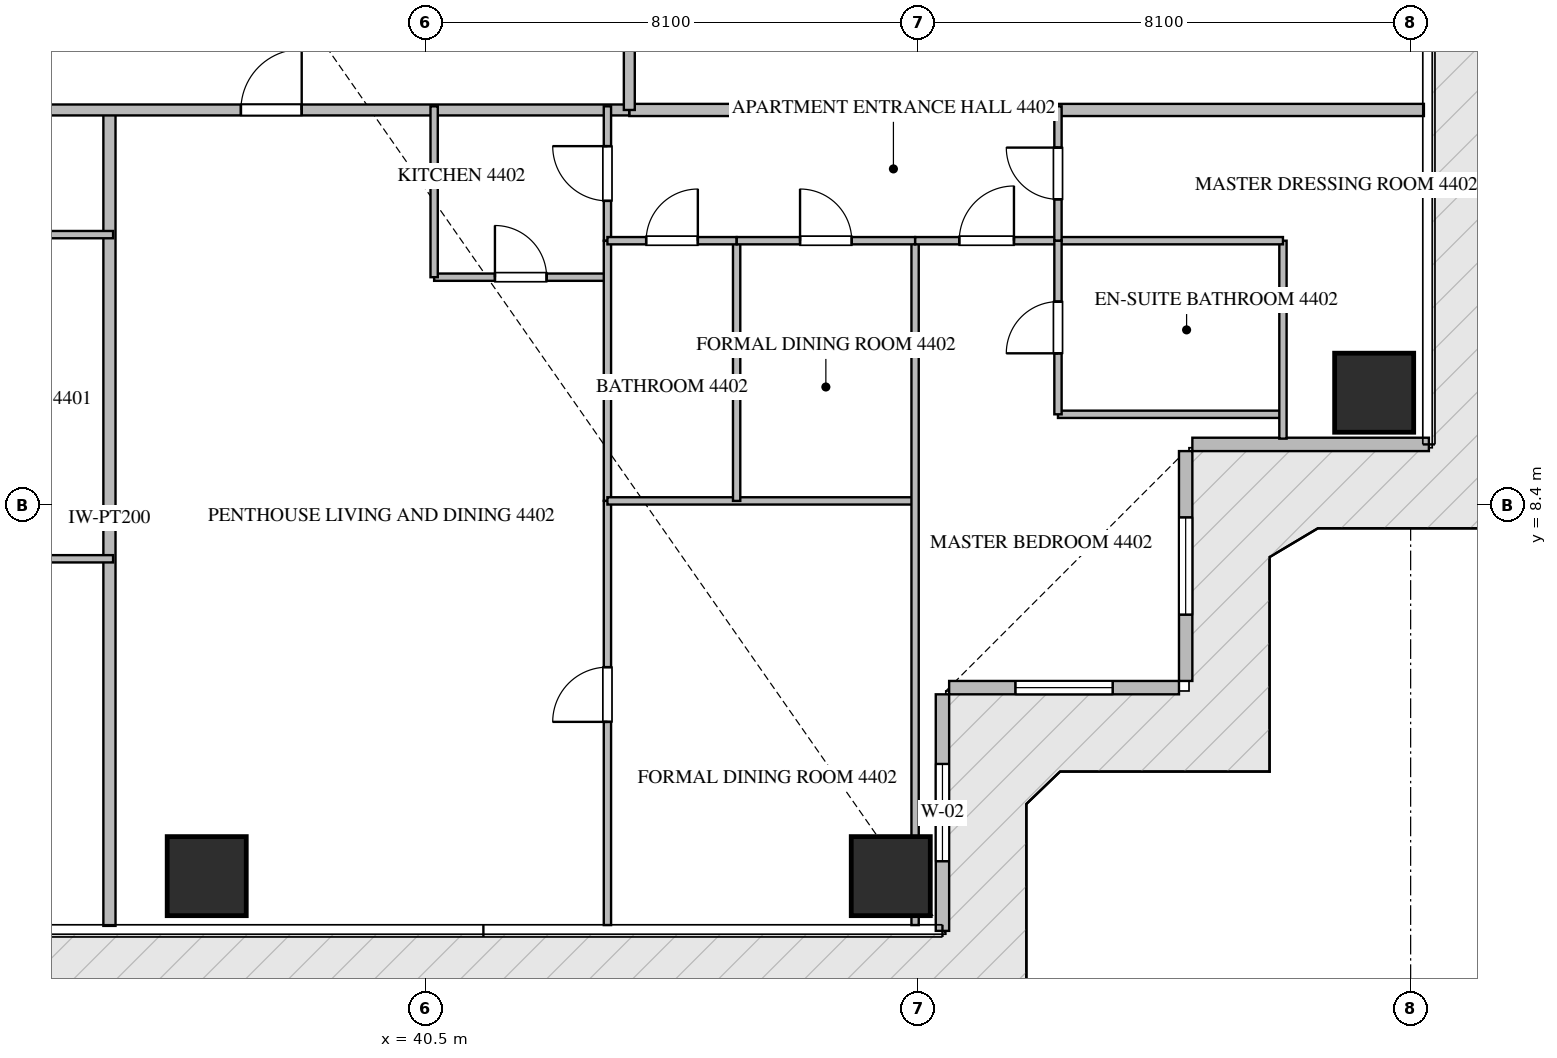
"""IFC4 building model, lengths in metres.
Left out: names, types, materials, properties, quantities, classifications, styles, units other than length and angle.
Written with IfcOpenShell. Run it as: python <this file> out.ifc"""

import sys

from ifc_helpers import new_model, si_unit, direction, frame, frame_2d, origin, origin_2d, place, context, subcontext, project, spatial, rectangle, extrude, source, transform, mapped, element, fill, save


model = new_model("IFC4")
c1 = context("Model", 3, precision=1e-05, world=origin(), true_north=direction((0.0, 1.0)))
c2 = subcontext(c1, "Body", "Model", "MODEL_VIEW")
j1 = project(units=[si_unit("LENGTHUNIT", "METRE"), si_unit("PLANEANGLEUNIT", "RADIAN")], contexts=[c1])
p1 = place(None, origin())
s1 = spatial("IfcSite", under=j1, at=p1, CompositionType="ELEMENT")
p2 = place(p1, origin())
s2 = spatial("IfcBuilding", under=s1, at=p2, CompositionType="ELEMENT")
p3 = place(p2, frame((0.0, 0.0, 176.4)))
s3 = spatial("IfcBuildingStorey", under=s2, at=p3, CompositionType="ELEMENT", Elevation=176.4)
m1 = source(origin(), c2, "Body", "SweptSolid", [
    extrude(rectangle(XDim=1.3, YDim=1.3, at=origin_2d()), origin(), (0.0, 0.0, 1.0), 3.75),
])
for number, where, z_axis, x_axis in (
    (1, (36.9, 2.3, -0.26), (0.0, 0.0, 1.0), (1.0, 0.0, 0.0)),
    (2, (48.15, 2.3, -0.26), (0.0, 0.0, 1.0), (1.0, 0.0, 0.0)),
    (3, (56.1, 10.25, -0.26), (0.0, 0.0, 1.0), (1.0, 0.0, 0.0)),
):
    element("IfcColumn", number, at=place(p3, frame(where, z_axis=z_axis, x_axis=x_axis)), inside=s3, PredefinedType="COLUMN", context=c2, shape_type="MappedRepresentation", body=[
        mapped(m1, transform((0.0, 0.0, 0.0), scale=1.0)),
    ])
p4 = place(p3, frame((49.0, 1.4, 0.0), z_axis=(0.0, 0.0, 1.0), x_axis=(0.0, 1.0, 0.0)))
e4 = element("IfcWall", 4, at=p4, inside=s3, PredefinedType="ELEMENTEDWALL", context=c2, shape_type="SweptSolid", body=[
    extrude(rectangle(XDim=3.89, YDim=0.22, at=frame_2d((1.945, 0.0))), origin(), (0.0, 0.0, 1.0), 3.475),
])
p5 = place(p4, frame((1.145, 0.0, 0.65)))
e5 = element("IfcOpeningElement", 5, at=p5, cuts=e4, PredefinedType="OPENING", context=c2, shape_type="SweptSolid", body=[
    extrude(rectangle(XDim=1.6, YDim=2.1, at=frame_2d((0.8, 1.05))), frame((0.0, 0.12, 0.0), z_axis=(0.0, -1.0, 0.0), x_axis=(1.0, 0.0, 0.0)), (0.0, 0.0, 1.0), 0.24),
])
p6 = place(p3, frame((49.11, 5.4, 0.0), z_axis=(0.0, 0.0, 1.0), x_axis=(1.0, 0.0, 0.0)))
e6 = element("IfcWall", 6, at=p6, inside=s3, PredefinedType="ELEMENTEDWALL", context=c2, shape_type="SweptSolid", body=[
    extrude(rectangle(XDim=3.78, YDim=0.22, at=frame_2d((1.89, 0.0))), origin(), (0.0, 0.0, 1.0), 3.475),
])
p7 = place(p6, frame((1.09, 0.0, 0.65)))
e7 = element("IfcOpeningElement", 7, at=p7, cuts=e6, PredefinedType="OPENING", context=c2, shape_type="SweptSolid", body=[
    extrude(rectangle(XDim=1.6, YDim=2.1, at=frame_2d((0.8, 1.05))), frame((0.0, 0.12, 0.0), z_axis=(0.0, -1.0, 0.0), x_axis=(1.0, 0.0, 0.0)), (0.0, 0.0, 1.0), 0.24),
])
p8 = place(p3, frame((53.0, 5.51, 0.0), z_axis=(0.0, 0.0, 1.0), x_axis=(0.0, 1.0, 0.0)))
e8 = element("IfcWall", 8, at=p8, inside=s3, PredefinedType="ELEMENTEDWALL", context=c2, shape_type="SweptSolid", body=[
    extrude(rectangle(XDim=3.78, YDim=0.22, at=frame_2d((1.89, 0.0))), origin(), (0.0, 0.0, 1.0), 3.475),
])
p9 = place(p8, frame((1.09, 0.0, 0.65)))
e9 = element("IfcOpeningElement", 9, at=p9, cuts=e8, PredefinedType="OPENING", context=c2, shape_type="SweptSolid", body=[
    extrude(rectangle(XDim=1.6, YDim=2.1, at=frame_2d((0.8, 1.05))), frame((0.0, 0.12, 0.0), z_axis=(0.0, -1.0, 0.0), x_axis=(1.0, 0.0, 0.0)), (0.0, 0.0, 1.0), 0.24),
])
p10 = place(p3, frame((53.11, 9.4, 0.0), z_axis=(0.0, 0.0, 1.0), x_axis=(1.0, 0.0, 0.0)))
e10 = element("IfcWall", 10, at=p10, inside=s3, PredefinedType="ELEMENTEDWALL", context=c2, shape_type="SweptSolid", body=[
    extrude(rectangle(XDim=3.89, YDim=0.22, at=frame_2d((1.945, 0.0))), origin(), (0.0, 0.0, 1.0), 3.475),
])
p11 = place(p3, frame((35.3, 1.482, 0.0), z_axis=(0.0, 0.0, 1.0), x_axis=(0.0, 1.0, 0.0)))
e11 = element("IfcWall", 11, at=p11, inside=s3, PredefinedType="PARTITIONING", context=c2, shape_type="SweptSolid", body=[
    extrude(rectangle(XDim=13.418, YDim=0.2, at=frame_2d((6.709, 0.0))), origin(), (0.0, 0.0, 1.0), 3.49),
])
p12 = place(p3, frame((43.85, 14.9, 0.0), z_axis=(0.0, 0.0, 1.0), x_axis=(1.0, 0.0, 0.0)))
e12 = element("IfcWall", 12, at=p12, inside=s3, PredefinedType="PARTITIONING", context=c2, shape_type="SweptSolid", body=[
    extrude(rectangle(XDim=13.068, YDim=0.2, at=frame_2d((6.534, 0.0))), origin(), (0.0, 0.0, 1.0), 3.49),
])
p13 = place(p3, frame((20.952, 14.9, 0.0), z_axis=(0.0, 0.0, 1.0), x_axis=(1.0, 0.0, 0.0)))
e13 = element("IfcWall", 13, at=p13, inside=s3, PredefinedType="PARTITIONING", context=c2, shape_type="SweptSolid", body=[
    extrude(rectangle(XDim=22.896, YDim=0.18, at=frame_2d((11.448, 0.0))), origin(), (0.0, 0.0, 1.0), 3.49),
])
p14 = place(p13, frame((5.934, 0.0, 0.0)))
e14 = element("IfcOpeningElement", 14, at=p14, cuts=e13, PredefinedType="OPENING", context=c2, shape_type="SweptSolid", body=[
    extrude(rectangle(XDim=1.0, YDim=2.15, at=frame_2d((0.5, 1.075))), frame((0.0, 0.1, 0.0), z_axis=(0.0, -1.0, 0.0), x_axis=(1.0, 0.0, 0.0)), (0.0, 0.0, 1.0), 0.2),
])
p15 = place(p13, frame((16.51, 0.0, 0.0)))
e15 = element("IfcOpeningElement", 15, at=p15, cuts=e13, PredefinedType="OPENING", context=c2, shape_type="SweptSolid", body=[
    extrude(rectangle(XDim=1.0, YDim=2.15, at=frame_2d((0.5, 1.075))), frame((0.0, 0.1, 0.0), z_axis=(0.0, -1.0, 0.0), x_axis=(1.0, 0.0, 0.0)), (0.0, 0.0, 1.0), 0.2),
])
p16 = place(p3, frame((43.85, 14.9, 0.0), z_axis=(0.0, 0.0, 1.0), x_axis=(0.0, 1.0, 0.0)))
e16 = element("IfcWall", 16, at=p16, inside=s3, PredefinedType="PARTITIONING", context=c2, shape_type="SweptSolid", body=[
    extrude(rectangle(XDim=18.7, YDim=0.18, at=frame_2d((9.35, 0.0))), origin(), (0.0, 0.0, 1.0), 3.49),
])
p17 = place(p16, frame((1.805, 0.0, 0.0)))
e17 = element("IfcOpeningElement", 17, at=p17, cuts=e16, PredefinedType="OPENING", context=c2, shape_type="SweptSolid", body=[
    extrude(rectangle(XDim=1.0, YDim=2.15, at=frame_2d((0.5, 1.075))), frame((0.0, 0.1, 0.0), z_axis=(0.0, -1.0, 0.0), x_axis=(1.0, 0.0, 0.0)), (0.0, 0.0, 1.0), 0.2),
])
for number, where, z_axis, x_axis in (
    (18, (30.27, 7.519, 0.0), (0.0, 0.0, 1.0), (1.0, 0.0, 0.0)),
    (19, (30.27, 12.85, 0.0), (0.0, 0.0, 1.0), (1.0, 0.0, 0.0)),
):
    element("IfcWall", number, at=place(p3, frame(where, z_axis=z_axis, x_axis=x_axis)), inside=s3, PredefinedType="PARTITIONING", context=c2, shape_type="SweptSolid", body=[
        extrude(rectangle(XDim=5.09, YDim=0.12, at=frame_2d((2.545, 0.0))), origin(), (0.0, 0.0, 1.0), 3.49),
    ])
p18 = place(p3, frame((40.64, 12.15, 0.0), z_axis=(0.0, 0.0, 1.0), x_axis=(1.0, 0.0, 0.0)))
e20 = element("IfcWall", 20, at=p18, inside=s3, PredefinedType="PARTITIONING", context=c2, shape_type="SweptSolid", body=[
    extrude(rectangle(XDim=2.85, YDim=0.12, at=frame_2d((1.425, 0.0))), origin(), (0.0, 0.0, 1.0), 3.49),
])
p19 = place(p18, frame((1.0, 0.0, 0.0)))
e21 = element("IfcOpeningElement", 21, at=p19, cuts=e20, PredefinedType="OPENING", context=c2, shape_type="SweptSolid", body=[
    extrude(rectangle(XDim=0.85, YDim=2.1, at=frame_2d((0.425, 1.05))), frame((0.0, 0.07, 0.0), z_axis=(0.0, -1.0, 0.0), x_axis=(1.0, 0.0, 0.0)), (0.0, 0.0, 1.0), 0.14),
])
p20 = place(p3, frame((40.64, 12.15, 0.0), z_axis=(0.0, 0.0, 1.0), x_axis=(0.0, 1.0, 0.0)))
e22 = element("IfcWall", 22, at=p20, inside=s3, PredefinedType="PARTITIONING", context=c2, shape_type="SweptSolid", body=[
    extrude(rectangle(XDim=2.81, YDim=0.12, at=frame_2d((1.405, 0.0))), origin(), (0.0, 0.0, 1.0), 3.49),
])
p21 = place(p3, frame((43.49, 12.75, 0.0), z_axis=(0.0, 0.0, 1.0), x_axis=(0.0, 1.0, 0.0)))
e23 = element("IfcWall", 23, at=p21, inside=s3, PredefinedType="PARTITIONING", context=c2, shape_type="SweptSolid", body=[
    extrude(rectangle(XDim=2.21, YDim=0.12, at=frame_2d((1.105, 0.0))), origin(), (0.0, 0.0, 1.0), 3.49),
])
p22 = place(p21, frame((0.655, 0.0, 0.0)))
e24 = element("IfcOpeningElement", 24, at=p22, cuts=e23, PredefinedType="OPENING", context=c2, shape_type="SweptSolid", body=[
    extrude(rectangle(XDim=0.9, YDim=2.1, at=frame_2d((0.45, 1.05))), frame((0.0, 0.07, 0.0), z_axis=(0.0, -1.0, 0.0), x_axis=(1.0, 0.0, 0.0)), (0.0, 0.0, 1.0), 0.14),
])
p23 = place(p3, frame((43.49, 1.495, 0.0), z_axis=(0.0, 0.0, 1.0), x_axis=(0.0, 1.0, 0.0)))
e25 = element("IfcWall", 25, at=p23, inside=s3, PredefinedType="PARTITIONING", context=c2, shape_type="SweptSolid", body=[
    extrude(rectangle(XDim=6.976, YDim=0.12, at=frame_2d((3.488, 0.0))), origin(), (0.0, 0.0, 1.0), 3.49),
])
p24 = place(p23, frame((3.342, 0.0, 0.0)))
e26 = element("IfcOpeningElement", 26, at=p24, cuts=e25, PredefinedType="OPENING", context=c2, shape_type="SweptSolid", body=[
    extrude(rectangle(XDim=0.9, YDim=2.1, at=frame_2d((0.45, 1.05))), frame((0.0, 0.07, 0.0), z_axis=(0.0, -1.0, 0.0), x_axis=(1.0, 0.0, 0.0)), (0.0, 0.0, 1.0), 0.14),
])
p25 = place(p3, frame((43.49, 8.473, 0.0), z_axis=(0.0, 0.0, 1.0), x_axis=(0.0, 1.0, 0.0)))
e27 = element("IfcWall", 27, at=p25, inside=s3, PredefinedType="PARTITIONING", context=c2, shape_type="SweptSolid", body=[
    extrude(rectangle(XDim=4.275, YDim=0.12, at=frame_2d((2.138, 0.0))), origin(), (0.0, 0.0, 1.0), 3.49),
])
p26 = place(p3, frame((43.49, 8.471, 0.0), z_axis=(0.0, 0.0, 1.0), x_axis=(1.0, 0.0, 0.0)))
e28 = element("IfcWall", 28, at=p26, inside=s3, PredefinedType="PARTITIONING", context=c2, shape_type="SweptSolid", body=[
    extrude(rectangle(XDim=5.06, YDim=0.12, at=frame_2d((2.53, 0.0))), origin(), (0.0, 0.0, 1.0), 3.49),
])
p27 = place(p3, frame((48.55, 1.495, 0.0), z_axis=(0.0, 0.0, 1.0), x_axis=(0.0, 1.0, 0.0)))
e29 = element("IfcWall", 29, at=p27, inside=s3, PredefinedType="PARTITIONING", context=c2, shape_type="SweptSolid", body=[
    extrude(rectangle(XDim=11.255, YDim=0.12, at=frame_2d((5.627, 0.0))), origin(), (0.0, 0.0, 1.0), 3.49),
])
p28 = place(p3, frame((45.615, 8.471, 0.0), z_axis=(0.0, 0.0, 1.0), x_axis=(0.0, 1.0, 0.0)))
e30 = element("IfcWall", 30, at=p28, inside=s3, PredefinedType="PARTITIONING", context=c2, shape_type="SweptSolid", body=[
    extrude(rectangle(XDim=4.279, YDim=0.12, at=frame_2d((2.14, 0.0))), origin(), (0.0, 0.0, 1.0), 3.49),
])
p29 = place(p3, frame((43.49, 12.75, 0.0), z_axis=(0.0, 0.0, 1.0), x_axis=(1.0, 0.0, 0.0)))
e31 = element("IfcWall", 31, at=p29, inside=s3, PredefinedType="PARTITIONING", context=c2, shape_type="SweptSolid", body=[
    extrude(rectangle(XDim=2.125, YDim=0.12, at=frame_2d((1.062, 0.0))), origin(), (0.0, 0.0, 1.0), 3.49),
])
p30 = place(p29, frame((0.637, 0.0, 0.0)))
e32 = element("IfcOpeningElement", 32, at=p30, cuts=e31, PredefinedType="OPENING", context=c2, shape_type="SweptSolid", body=[
    extrude(rectangle(XDim=0.85, YDim=2.1, at=frame_2d((0.425, 1.05))), frame((0.0, 0.07, 0.0), z_axis=(0.0, -1.0, 0.0), x_axis=(1.0, 0.0, 0.0)), (0.0, 0.0, 1.0), 0.14),
])
p31 = place(p3, frame((45.617, 12.75, 0.0), z_axis=(0.0, 0.0, 1.0), x_axis=(1.0, 0.0, 0.0)))
e33 = element("IfcWall", 33, at=p31, inside=s3, PredefinedType="PARTITIONING", context=c2, shape_type="SweptSolid", body=[
    extrude(rectangle(XDim=2.933, YDim=0.12, at=frame_2d((1.467, 0.0))), origin(), (0.0, 0.0, 1.0), 3.49),
])
p32 = place(p31, frame((1.041, 0.0, 0.0)))
e34 = element("IfcOpeningElement", 34, at=p32, cuts=e33, PredefinedType="OPENING", context=c2, shape_type="SweptSolid", body=[
    extrude(rectangle(XDim=0.85, YDim=2.1, at=frame_2d((0.425, 1.05))), frame((0.0, 0.07, 0.0), z_axis=(0.0, -1.0, 0.0), x_axis=(1.0, 0.0, 0.0)), (0.0, 0.0, 1.0), 0.14),
])
p33 = place(p3, frame((48.552, 12.75, 0.0), z_axis=(0.0, 0.0, 1.0), x_axis=(1.0, 0.0, 0.0)))
e35 = element("IfcWall", 35, at=p33, inside=s3, PredefinedType="PARTITIONING", context=c2, shape_type="SweptSolid", body=[
    extrude(rectangle(XDim=2.348, YDim=0.12, at=frame_2d((1.174, 0.0))), origin(), (0.0, 0.0, 1.0), 3.49),
])
p34 = place(p33, frame((0.724, 0.0, 0.0)))
e36 = element("IfcOpeningElement", 36, at=p34, cuts=e35, PredefinedType="OPENING", context=c2, shape_type="SweptSolid", body=[
    extrude(rectangle(XDim=0.9, YDim=2.1, at=frame_2d((0.45, 1.05))), frame((0.0, 0.07, 0.0), z_axis=(0.0, -1.0, 0.0), x_axis=(1.0, 0.0, 0.0)), (0.0, 0.0, 1.0), 0.14),
])
p35 = place(p3, frame((50.9, 9.895, 0.0), z_axis=(0.0, 0.0, 1.0), x_axis=(1.0, 0.0, 0.0)))
e37 = element("IfcWall", 37, at=p35, inside=s3, PredefinedType="PARTITIONING", context=c2, shape_type="SweptSolid", body=[
    extrude(rectangle(XDim=3.7, YDim=0.12, at=frame_2d((1.85, 0.0))), origin(), (0.0, 0.0, 1.0), 3.49),
])
p36 = place(p3, frame((54.6, 9.495, 0.0), z_axis=(0.0, 0.0, 1.0), x_axis=(0.0, 1.0, 0.0)))
e38 = element("IfcWall", 38, at=p36, inside=s3, PredefinedType="PARTITIONING", context=c2, shape_type="SweptSolid", body=[
    extrude(rectangle(XDim=3.255, YDim=0.12, at=frame_2d((1.627, 0.0))), origin(), (0.0, 0.0, 1.0), 3.49),
])
p37 = place(p3, frame((50.902, 12.75, 0.0), z_axis=(0.0, 0.0, 1.0), x_axis=(1.0, 0.0, 0.0)))
e39 = element("IfcWall", 39, at=p37, inside=s3, PredefinedType="PARTITIONING", context=c2, shape_type="SweptSolid", body=[
    extrude(rectangle(XDim=3.698, YDim=0.12, at=frame_2d((1.849, 0.0))), origin(), (0.0, 0.0, 1.0), 3.49),
])
p38 = place(p3, frame((50.9, 9.895, 0.0), z_axis=(0.0, 0.0, 1.0), x_axis=(0.0, 1.0, 0.0)))
e40 = element("IfcWall", 40, at=p38, inside=s3, PredefinedType="PARTITIONING", context=c2, shape_type="SweptSolid", body=[
    extrude(rectangle(XDim=2.855, YDim=0.12, at=frame_2d((1.427, 0.0))), origin(), (0.0, 0.0, 1.0), 3.49),
])
p39 = place(p38, frame((1.003, 0.0, 0.0)))
e41 = element("IfcOpeningElement", 41, at=p39, cuts=e40, PredefinedType="OPENING", context=c2, shape_type="SweptSolid", body=[
    extrude(rectangle(XDim=0.85, YDim=2.1, at=frame_2d((0.425, 1.05))), frame((0.0, 0.07, 0.0), z_axis=(0.0, -1.0, 0.0), x_axis=(1.0, 0.0, 0.0)), (0.0, 0.0, 1.0), 0.14),
])
p40 = place(p3, frame((50.9, 12.752, 0.0), z_axis=(0.0, 0.0, 1.0), x_axis=(0.0, 1.0, 0.0)))
e42 = element("IfcWall", 42, at=p40, inside=s3, PredefinedType="PARTITIONING", context=c2, shape_type="SweptSolid", body=[
    extrude(rectangle(XDim=2.208, YDim=0.12, at=frame_2d((1.104, 0.0))), origin(), (0.0, 0.0, 1.0), 3.49),
])
p41 = place(p40, frame((0.679, 0.0, 0.0)))
e43 = element("IfcOpeningElement", 43, at=p41, cuts=e42, PredefinedType="OPENING", context=c2, shape_type="SweptSolid", body=[
    extrude(rectangle(XDim=0.85, YDim=2.1, at=frame_2d((0.425, 1.05))), frame((0.0, 0.07, 0.0), z_axis=(0.0, -1.0, 0.0), x_axis=(1.0, 0.0, 0.0)), (0.0, 0.0, 1.0), 0.14),
])
m2 = source(origin(), c2, "Body", "SweptSolid", [
    extrude(rectangle(XDim=1.6, YDim=2.1, at=frame_2d((0.8, 1.05))), frame((0.0, 0.03, 0.0), z_axis=(0.0, -1.0, 0.0), x_axis=(1.0, 0.0, 0.0)), (0.0, 0.0, 1.0), 0.06),
])
p42 = place(p5, origin())
e44 = element("IfcWindow", 44, at=p42, inside=s3, PartitioningType="SINGLE_PANEL", PredefinedType="WINDOW", context=c2, shape_type="MappedRepresentation", body=[
    mapped(m2, transform((0.0, 0.0, 0.0), scale=1.0)),
])
fill(e5, e44)
p43 = place(p7, origin())
e45 = element("IfcWindow", 45, at=p43, inside=s3, PartitioningType="SINGLE_PANEL", PredefinedType="WINDOW", context=c2, shape_type="MappedRepresentation", body=[
    mapped(m2, transform((0.0, 0.0, 0.0), scale=1.0)),
])
fill(e7, e45)
p44 = place(p9, origin())
e46 = element("IfcWindow", 46, at=p44, inside=s3, PartitioningType="SINGLE_PANEL", PredefinedType="WINDOW", context=c2, shape_type="MappedRepresentation", body=[
    mapped(m2, transform((0.0, 0.0, 0.0), scale=1.0)),
])
fill(e9, e46)
m3 = source(origin(), c2, "Body", "SweptSolid", [
    extrude(rectangle(XDim=1.0, YDim=2.15, at=frame_2d((0.5, 1.075))), frame((0.0, 0.025, 0.0), z_axis=(0.0, -1.0, 0.0), x_axis=(1.0, 0.0, 0.0)), (0.0, 0.0, 1.0), 0.05),
])
p45 = place(p15, origin())
e47 = element("IfcDoor", 47, at=p45, inside=s3, OperationType="SINGLE_SWING_RIGHT", PredefinedType="DOOR", context=c2, shape_type="MappedRepresentation", body=[
    mapped(m3, transform((0.0, 0.0, 0.0), scale=1.0)),
])
fill(e15, e47)
m4 = source(origin(), c2, "Body", "SweptSolid", [
    extrude(rectangle(XDim=0.85, YDim=2.1, at=frame_2d((0.425, 1.05))), frame((0.0, 0.025, 0.0), z_axis=(0.0, -1.0, 0.0), x_axis=(1.0, 0.0, 0.0)), (0.0, 0.0, 1.0), 0.05),
])
p46 = place(p19, origin())
e48 = element("IfcDoor", 48, at=p46, inside=s3, OperationType="SINGLE_SWING_LEFT", PredefinedType="DOOR", context=c2, shape_type="MappedRepresentation", body=[
    mapped(m4, transform((0.0, 0.0, 0.0), scale=1.0)),
])
fill(e21, e48)
m5 = source(origin(), c2, "Body", "SweptSolid", [
    extrude(rectangle(XDim=0.9, YDim=2.1, at=frame_2d((0.45, 1.05))), frame((0.0, 0.025, 0.0), z_axis=(0.0, -1.0, 0.0), x_axis=(1.0, 0.0, 0.0)), (0.0, 0.0, 1.0), 0.05),
])
p47 = place(p22, origin())
e49 = element("IfcDoor", 49, at=p47, inside=s3, OperationType="SINGLE_SWING_RIGHT", PredefinedType="DOOR", context=c2, shape_type="MappedRepresentation", body=[
    mapped(m5, transform((0.0, 0.0, 0.0), scale=1.0)),
])
fill(e24, e49)
p48 = place(p24, origin())
e50 = element("IfcDoor", 50, at=p48, inside=s3, OperationType="SINGLE_SWING_LEFT", PredefinedType="DOOR", context=c2, shape_type="MappedRepresentation", body=[
    mapped(m5, transform((0.0, 0.0, 0.0), scale=1.0)),
])
fill(e26, e50)
p49 = place(p30, origin())
e51 = element("IfcDoor", 51, at=p49, inside=s3, OperationType="SINGLE_SWING_RIGHT", PredefinedType="DOOR", context=c2, shape_type="MappedRepresentation", body=[
    mapped(m4, transform((0.0, 0.0, 0.0), scale=1.0)),
])
fill(e32, e51)
p50 = place(p32, origin())
e52 = element("IfcDoor", 52, at=p50, inside=s3, OperationType="SINGLE_SWING_LEFT", PredefinedType="DOOR", context=c2, shape_type="MappedRepresentation", body=[
    mapped(m4, transform((0.0, 0.0, 0.0), scale=1.0)),
])
fill(e34, e52)
p51 = place(p34, origin())
e53 = element("IfcDoor", 53, at=p51, inside=s3, OperationType="SINGLE_SWING_RIGHT", PredefinedType="DOOR", context=c2, shape_type="MappedRepresentation", body=[
    mapped(m5, transform((0.0, 0.0, 0.0), scale=1.0)),
])
fill(e36, e53)
p52 = place(p39, origin())
e54 = element("IfcDoor", 54, at=p52, inside=s3, OperationType="SINGLE_SWING_LEFT", PredefinedType="DOOR", context=c2, shape_type="MappedRepresentation", body=[
    mapped(m4, transform((0.0, 0.0, 0.0), scale=1.0)),
])
fill(e41, e54)
p53 = place(p41, origin())
e55 = element("IfcDoor", 55, at=p53, inside=s3, OperationType="SINGLE_SWING_RIGHT", PredefinedType="DOOR", context=c2, shape_type="MappedRepresentation", body=[
    mapped(m4, transform((0.0, 0.0, 0.0), scale=1.0)),
])
fill(e43, e55)
save(model, sys.argv[1])
